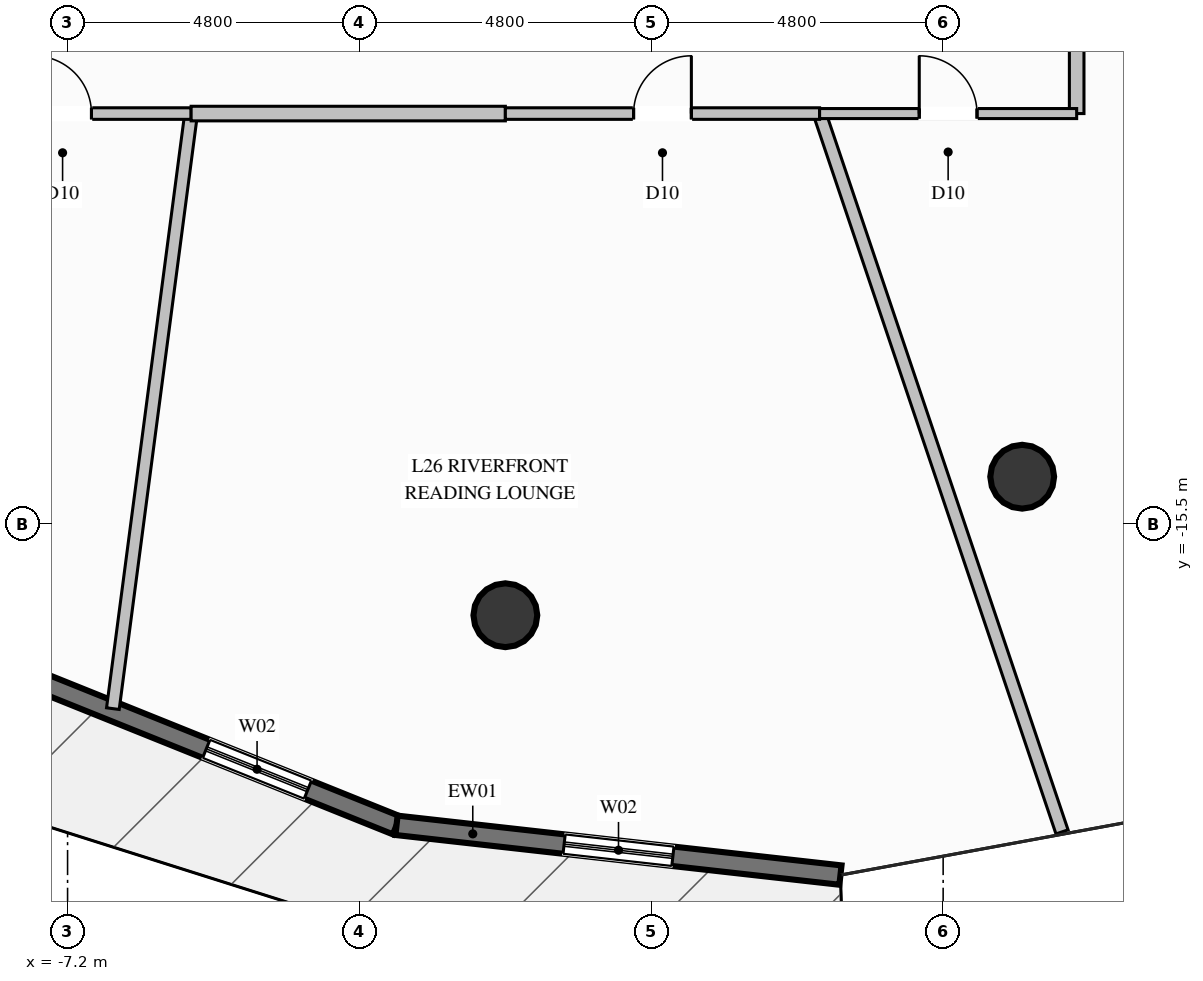
"""IFC4 building model, lengths in metres.
Left out: names, types, materials, properties, quantities, classifications, styles, units other than length and angle.
Written with IfcOpenShell. Run it as: python <this file> out.ifc"""

import sys

from ifc_helpers import new_model, si_unit, direction, frame, frame_2d, origin, origin_2d, place, context, subcontext, project, spatial, rectangle, circle, extrude, element, fill, save


model = new_model("IFC4")
c1 = context("Model", 3, precision=1e-05, world=origin(), true_north=direction((0.0, 1.0)))
c2 = subcontext(c1, "Body", "Model", "MODEL_VIEW")
j1 = project(units=[si_unit("LENGTHUNIT", "METRE"), si_unit("PLANEANGLEUNIT", "RADIAN")], contexts=[c1])
p1 = place(None, origin())
s1 = spatial("IfcSite", under=j1, at=p1, CompositionType="ELEMENT")
p2 = place(p1, origin())
s2 = spatial("IfcBuilding", under=s1, at=p2, CompositionType="ELEMENT")
p3 = place(p2, frame((0.0, 0.0, 106.2)))
s3 = spatial("IfcBuildingStorey", under=s2, at=p3, CompositionType="ELEMENT", Elevation=106.2)
for number, where, z_axis, x_axis in (
    (1, (0.0, -17.0, 0.0), (0.0, 0.0, 1.0), (1.0, 0.0, 0.0)),
    (2, (8.5, -14.722, 0.0), (0.0, 0.0, 1.0), (1.0, 0.0, 0.0)),
):
    element("IfcColumn", number, at=place(p3, frame(where, z_axis=z_axis, x_axis=x_axis)), inside=s3, PredefinedType="COLUMN", context=c2, shape_type="SweptSolid", body=[
        extrude(circle(Radius=0.525, at=origin_2d()), origin(), (0.0, 0.0, 1.0), 3.6),
    ])
p4 = place(p3, frame((-1.79, -20.455, 0.0), z_axis=(0.0, 0.0, 1.0), x_axis=(-0.927795739468, 0.373088549577, 0.0)))
e3 = element("IfcWall", 3, at=p4, inside=s3, PredefinedType="SOLIDWALL", context=c2, shape_type="SweptSolid", body=[
    extrude(rectangle(XDim=7.559, YDim=0.32, at=frame_2d((3.779, 0.0))), origin(), (0.0, 0.0, 1.0), 3.35),
])
p5 = place(p4, frame((1.572, 0.0, 0.35)))
e4 = element("IfcOpeningElement", 4, at=p5, cuts=e3, PredefinedType="OPENING", context=c2, shape_type="SweptSolid", body=[
    extrude(rectangle(XDim=1.8, YDim=2.6, at=frame_2d((0.9, 1.3))), frame((0.0, 0.17, 0.0), z_axis=(0.0, -1.0, 0.0), x_axis=(1.0, 0.0, 0.0)), (0.0, 0.0, 1.0), 0.34),
])
p6 = place(p3, frame((5.511, -21.273, 0.0), z_axis=(0.0, 0.0, 1.0), x_axis=(-0.993784044115, 0.111325081016, 0.0)))
e5 = element("IfcWall", 5, at=p6, inside=s3, PredefinedType="SOLIDWALL", context=c2, shape_type="SweptSolid", body=[
    extrude(rectangle(XDim=7.347, YDim=0.32, at=frame_2d((3.673, 0.0))), origin(), (0.0, 0.0, 1.0), 3.35),
])
p7 = place(p6, frame((2.773, 0.0, 0.35)))
e6 = element("IfcOpeningElement", 6, at=p7, cuts=e5, PredefinedType="OPENING", context=c2, shape_type="SweptSolid", body=[
    extrude(rectangle(XDim=1.8, YDim=2.6, at=frame_2d((0.9, 1.3))), frame((0.0, 0.17, 0.0), z_axis=(0.0, -1.0, 0.0), x_axis=(1.0, 0.0, 0.0)), (0.0, 0.0, 1.0), 0.34),
])
p8 = place(p3, frame((9.396, -5.325, 0.0), z_axis=(0.0, 0.0, 1.0), x_axis=(0.862912125579, -0.505353998232, 0.0)))
e7 = element("IfcWall", 7, at=p8, inside=s3, PredefinedType="PARTITIONING", context=c2, shape_type="SweptSolid", body=[
    extrude(rectangle(XDim=5.658, YDim=0.21, at=frame_2d((2.829, 0.0))), origin(), (0.0, 0.0, 1.0), 2.719),
])
p9 = place(p3, frame((-5.168, -8.75, 0.0), z_axis=(0.0, 0.0, 1.0), x_axis=(-0.130403964366, -0.991460945311, 0.0)))
e8 = element("IfcWall", 8, at=p9, inside=s3, PredefinedType="PARTITIONING", context=c2, shape_type="SweptSolid", body=[
    extrude(rectangle(XDim=9.87, YDim=0.21, at=frame_2d((4.935, 0.0))), origin(), (0.0, 0.0, 1.0), 3.35),
])
p10 = place(p3, frame((-9.396, -8.75, 0.0), z_axis=(0.0, 0.0, 1.0), x_axis=(1.0, 0.0, 0.0)))
e9 = element("IfcWall", 9, at=p10, inside=s3, PredefinedType="PARTITIONING", context=c2, shape_type="SweptSolid", body=[
    extrude(rectangle(XDim=4.228, YDim=0.19, at=frame_2d((2.114, 0.0))), origin(), (0.0, 0.0, 1.0), 3.35),
])
p11 = place(p10, frame((1.639, 0.0, 0.0)))
e10 = element("IfcOpeningElement", 10, at=p11, cuts=e9, PredefinedType="OPENING", context=c2, shape_type="SweptSolid", body=[
    extrude(rectangle(XDim=0.95, YDim=2.1, at=frame_2d((0.475, 1.05))), frame((0.0, 0.105, 0.0), z_axis=(0.0, -1.0, 0.0), x_axis=(1.0, 0.0, 0.0)), (0.0, 0.0, 1.0), 0.21),
])
p12 = place(p3, frame((5.168, -8.75, 0.0), z_axis=(0.0, 0.0, 1.0), x_axis=(0.319791389232, -0.947487977429, 0.0)))
e11 = element("IfcWall", 11, at=p12, inside=s3, PredefinedType="PARTITIONING", context=c2, shape_type="SweptSolid", body=[
    extrude(rectangle(XDim=12.468, YDim=0.21, at=frame_2d((6.234, 0.0))), origin(), (0.0, 0.0, 1.0), 3.35),
])
p13 = place(p3, frame((-5.168, -8.75, 0.0), z_axis=(0.0, 0.0, 1.0), x_axis=(1.0, 0.0, 0.0)))
e12 = element("IfcWall", 12, at=p13, inside=s3, PredefinedType="PARTITIONING", context=c2, shape_type="SweptSolid", body=[
    extrude(rectangle(XDim=5.168, YDim=0.24, at=frame_2d((2.584, 0.0))), origin(), (0.0, 0.0, 1.0), 3.35),
])
p14 = place(p3, frame((0.0, -8.75, 0.0), z_axis=(0.0, 0.0, 1.0), x_axis=(1.0, 0.0, 0.0)))
e13 = element("IfcWall", 13, at=p14, inside=s3, PredefinedType="PARTITIONING", context=c2, shape_type="SweptSolid", body=[
    extrude(rectangle(XDim=5.168, YDim=0.19, at=frame_2d((2.584, 0.0))), origin(), (0.0, 0.0, 1.0), 3.35),
])
p15 = place(p14, frame((2.109, 0.0, 0.0)))
e14 = element("IfcOpeningElement", 14, at=p15, cuts=e13, PredefinedType="OPENING", context=c2, shape_type="SweptSolid", body=[
    extrude(rectangle(XDim=0.95, YDim=2.1, at=frame_2d((0.475, 1.05))), frame((0.0, 0.105, 0.0), z_axis=(0.0, -1.0, 0.0), x_axis=(1.0, 0.0, 0.0)), (0.0, 0.0, 1.0), 0.21),
])
p16 = place(p3, frame((9.396, -8.75, 0.0), z_axis=(0.0, 0.0, 1.0), x_axis=(0.0, 1.0, 0.0)))
e15 = element("IfcWall", 15, at=p16, inside=s3, PredefinedType="PARTITIONING", context=c2, shape_type="SweptSolid", body=[
    extrude(rectangle(XDim=3.425, YDim=0.24, at=frame_2d((1.712, 0.0))), origin(), (0.0, 0.0, 1.0), 3.35),
])
p17 = place(p3, frame((5.168, -8.75, 0.0), z_axis=(0.0, 0.0, 1.0), x_axis=(1.0, 0.0, 0.0)))
e16 = element("IfcWall", 16, at=p17, inside=s3, PredefinedType="PARTITIONING", context=c2, shape_type="SweptSolid", body=[
    extrude(rectangle(XDim=4.228, YDim=0.165, at=frame_2d((2.114, 0.0))), origin(), (0.0, 0.0, 1.0), 3.35),
])
p18 = place(p17, frame((1.639, 0.0, 0.0)))
e17 = element("IfcOpeningElement", 17, at=p18, cuts=e16, PredefinedType="OPENING", context=c2, shape_type="SweptSolid", body=[
    extrude(rectangle(XDim=0.95, YDim=2.1, at=frame_2d((0.475, 1.05))), frame((0.0, 0.093, 0.0), z_axis=(0.0, -1.0, 0.0), x_axis=(1.0, 0.0, 0.0)), (0.0, 0.0, 1.0), 0.185),
])
p19 = place(p5, origin())
e18 = element("IfcWindow", 18, at=p19, inside=s3, PartitioningType="SINGLE_PANEL", PredefinedType="WINDOW", context=c2, shape_type="SweptSolid", body=[
    extrude(rectangle(XDim=1.8, YDim=2.6, at=frame_2d((0.9, 1.3))), frame((0.0, 0.03, 0.0), z_axis=(0.0, -1.0, 0.0), x_axis=(1.0, 0.0, 0.0)), (0.0, 0.0, 1.0), 0.06),
])
fill(e4, e18)
p20 = place(p7, origin())
e19 = element("IfcWindow", 19, at=p20, inside=s3, PartitioningType="SINGLE_PANEL", PredefinedType="WINDOW", context=c2, shape_type="SweptSolid", body=[
    extrude(rectangle(XDim=1.8, YDim=2.6, at=frame_2d((0.9, 1.3))), frame((0.0, 0.03, 0.0), z_axis=(0.0, -1.0, 0.0), x_axis=(1.0, 0.0, 0.0)), (0.0, 0.0, 1.0), 0.06),
])
fill(e6, e19)
p21 = place(p11, origin())
e20 = element("IfcDoor", 20, at=p21, inside=s3, OperationType="SINGLE_SWING_LEFT", PredefinedType="DOOR", context=c2, shape_type="SweptSolid", body=[
    extrude(rectangle(XDim=0.95, YDim=2.1, at=frame_2d((0.475, 1.05))), frame((0.0, 0.025, 0.0), z_axis=(0.0, -1.0, 0.0), x_axis=(1.0, 0.0, 0.0)), (0.0, 0.0, 1.0), 0.05),
])
fill(e10, e20)
p22 = place(p15, origin())
e21 = element("IfcDoor", 21, at=p22, inside=s3, OperationType="SINGLE_SWING_RIGHT", PredefinedType="DOOR", context=c2, shape_type="SweptSolid", body=[
    extrude(rectangle(XDim=0.95, YDim=2.1, at=frame_2d((0.475, 1.05))), frame((0.0, 0.025, 0.0), z_axis=(0.0, -1.0, 0.0), x_axis=(1.0, 0.0, 0.0)), (0.0, 0.0, 1.0), 0.05),
])
fill(e14, e21)
p23 = place(p18, origin())
e22 = element("IfcDoor", 22, at=p23, inside=s3, OperationType="SINGLE_SWING_LEFT", PredefinedType="DOOR", context=c2, shape_type="SweptSolid", body=[
    extrude(rectangle(XDim=0.95, YDim=2.1, at=frame_2d((0.475, 1.05))), frame((0.0, 0.025, 0.0), z_axis=(0.0, -1.0, 0.0), x_axis=(1.0, 0.0, 0.0)), (0.0, 0.0, 1.0), 0.05),
])
fill(e17, e22)
save(model, sys.argv[1])
